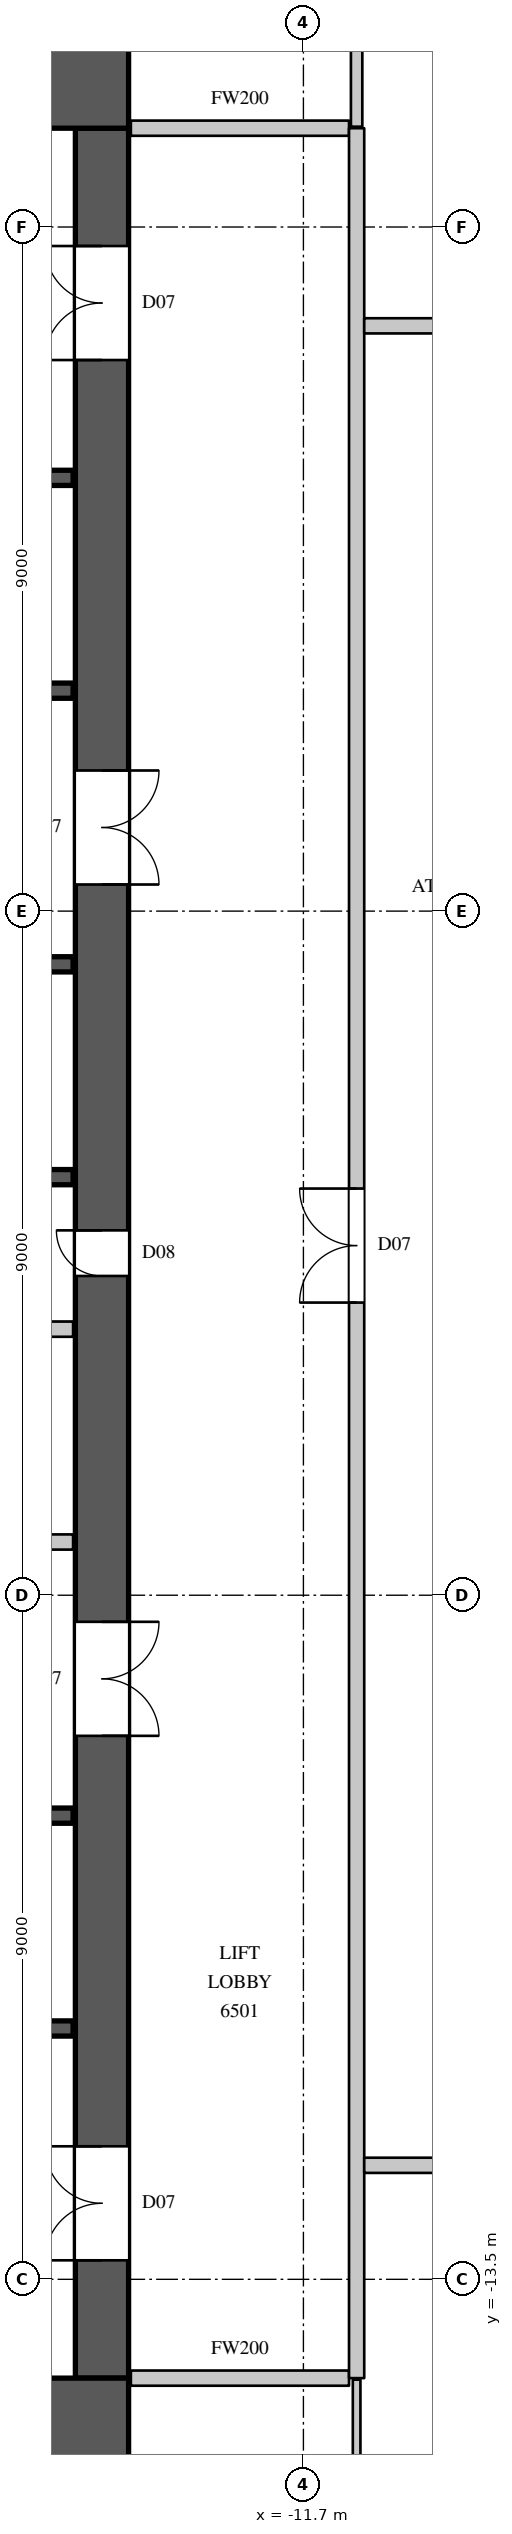
"""IFC4 building model, lengths in metres.
Left out: names, types, materials, properties, quantities, classifications, styles, units other than length and angle.
Written with IfcOpenShell. Run it as: python <this file> out.ifc"""

import sys

from ifc_helpers import new_model, si_unit, direction, frame, frame_2d, origin, place, context, subcontext, project, spatial, rectangle, extrude, element, fill, save


model = new_model("IFC4")
c1 = context("Model", 3, precision=1e-05, world=origin(), true_north=direction((0.0, 1.0)))
c2 = subcontext(c1, "Body", "Model", "MODEL_VIEW")
j1 = project(units=[si_unit("LENGTHUNIT", "METRE"), si_unit("PLANEANGLEUNIT", "RADIAN")], contexts=[c1])
p1 = place(None, origin())
s1 = spatial("IfcSite", under=j1, at=p1, CompositionType="ELEMENT")
p2 = place(p1, origin())
s2 = spatial("IfcBuilding", under=s1, at=p2, CompositionType="ELEMENT")
p3 = place(p2, frame((0.0, 0.0, 288.5)))
s3 = spatial("IfcBuildingStorey", under=s2, at=p3, CompositionType="ELEMENT", Elevation=288.5)
for number, where, z_axis, x_axis in (
    (1, (-30.0, 15.4, 0.0), (0.0, 0.0, 1.0), (1.0, 0.0, 0.0)),
    (2, (-30.0, -15.4, 0.0), (0.0, 0.0, 1.0), (1.0, 0.0, 0.0)),
):
    element("IfcWall", number, at=place(p3, frame(where, z_axis=z_axis, x_axis=x_axis)), inside=s3, PredefinedType="SHEAR", context=c2, shape_type="SweptSolid", body=[
        extrude(rectangle(XDim=16.0, YDim=1.2, at=frame_2d((8.0, 0.0))), origin(), (0.0, 0.0, 1.0), 4.1),
    ])
p4 = place(p3, frame((-14.35, -14.8, 0.0), z_axis=(0.0, 0.0, 1.0), x_axis=(0.0, 1.0, 0.0)))
e3 = element("IfcWall", 3, at=p4, inside=s3, PredefinedType="SHEAR", context=c2, shape_type="SweptSolid", body=[
    extrude(rectangle(XDim=29.6, YDim=0.7, at=frame_2d((14.8, 0.0))), origin(), (0.0, 0.0, 1.0), 4.1),
])
p5 = place(p4, frame((1.55, 0.0, 0.0)))
e4 = element("IfcOpeningElement", 4, at=p5, cuts=e3, PredefinedType="OPENING", context=c2, shape_type="SweptSolid", body=[
    extrude(rectangle(XDim=1.5, YDim=2.4, at=frame_2d((0.75, 1.2))), frame((0.0, 0.36, 0.0), z_axis=(0.0, -1.0, 0.0), x_axis=(1.0, 0.0, 0.0)), (0.0, 0.0, 1.0), 0.72),
])
p6 = place(p4, frame((26.55, 0.0, 0.0)))
e5 = element("IfcOpeningElement", 5, at=p6, cuts=e3, PredefinedType="OPENING", context=c2, shape_type="SweptSolid", body=[
    extrude(rectangle(XDim=1.5, YDim=2.4, at=frame_2d((0.75, 1.2))), frame((0.0, 0.36, 0.0), z_axis=(0.0, -1.0, 0.0), x_axis=(1.0, 0.0, 0.0)), (0.0, 0.0, 1.0), 0.72),
])
p7 = place(p4, frame((8.45, 0.0, 0.0)))
e6 = element("IfcOpeningElement", 6, at=p7, cuts=e3, PredefinedType="OPENING", context=c2, shape_type="SweptSolid", body=[
    extrude(rectangle(XDim=1.5, YDim=2.4, at=frame_2d((0.75, 1.2))), frame((0.0, 0.36, 0.0), z_axis=(0.0, -1.0, 0.0), x_axis=(1.0, 0.0, 0.0)), (0.0, 0.0, 1.0), 0.72),
])
p8 = place(p4, frame((19.65, 0.0, 0.0)))
e7 = element("IfcOpeningElement", 7, at=p8, cuts=e3, PredefinedType="OPENING", context=c2, shape_type="SweptSolid", body=[
    extrude(rectangle(XDim=1.5, YDim=2.4, at=frame_2d((0.75, 1.2))), frame((0.0, 0.36, 0.0), z_axis=(0.0, -1.0, 0.0), x_axis=(1.0, 0.0, 0.0)), (0.0, 0.0, 1.0), 0.72),
])
p9 = place(p4, frame((14.5, 0.0, 0.0)))
e8 = element("IfcOpeningElement", 8, at=p9, cuts=e3, PredefinedType="OPENING", context=c2, shape_type="SweptSolid", body=[
    extrude(rectangle(XDim=0.6, YDim=2.0, at=frame_2d((0.3, 1.0))), frame((0.0, 0.36, 0.0), z_axis=(0.0, -1.0, 0.0), x_axis=(1.0, 0.0, 0.0)), (0.0, 0.0, 1.0), 0.72),
])
p10 = place(p3, frame((-29.27, -3.8, 0.0), z_axis=(0.0, 0.0, 1.0), x_axis=(1.0, 0.0, 0.0)))
e9 = element("IfcWall", 9, at=p10, inside=s3, PredefinedType="PARTITIONING", context=c2, shape_type="SweptSolid", body=[
    extrude(rectangle(XDim=14.54, YDim=0.2, at=frame_2d((7.27, 0.0))), origin(), (0.0, 0.0, 1.0), 3.8),
])
p11 = place(p10, frame((1.15, 0.0, 0.0)))
e10 = element("IfcOpeningElement", 10, at=p11, cuts=e9, PredefinedType="OPENING", context=c2, shape_type="SweptSolid", body=[
    extrude(rectangle(XDim=0.9, YDim=2.2, at=frame_2d((0.45, 1.1))), frame((0.0, 0.11, 0.0), z_axis=(0.0, -1.0, 0.0), x_axis=(1.0, 0.0, 0.0)), (0.0, 0.0, 1.0), 0.22),
])
p12 = place(p10, frame((5.0, 0.0, 0.0)))
e11 = element("IfcOpeningElement", 11, at=p12, cuts=e9, PredefinedType="OPENING", context=c2, shape_type="SweptSolid", body=[
    extrude(rectangle(XDim=0.9, YDim=2.2, at=frame_2d((0.45, 1.1))), frame((0.0, 0.11, 0.0), z_axis=(0.0, -1.0, 0.0), x_axis=(1.0, 0.0, 0.0)), (0.0, 0.0, 1.0), 0.22),
])
p13 = place(p10, frame((10.65, 0.0, 0.0)))
e12 = element("IfcOpeningElement", 12, at=p13, cuts=e9, PredefinedType="OPENING", context=c2, shape_type="SweptSolid", body=[
    extrude(rectangle(XDim=0.9, YDim=2.2, at=frame_2d((0.45, 1.1))), frame((0.0, 0.11, 0.0), z_axis=(0.0, -1.0, 0.0), x_axis=(1.0, 0.0, 0.0)), (0.0, 0.0, 1.0), 0.22),
])
for number, where, z_axis, x_axis in (
    (13, (-13.97, -14.8, 0.0), (0.0, 0.0, 1.0), (1.0, 0.0, 0.0)),
    (14, (-13.97, 14.8, 0.0), (0.0, 0.0, 1.0), (1.0, 0.0, 0.0)),
):
    element("IfcWall", number, at=place(p3, frame(where, z_axis=z_axis, x_axis=x_axis)), inside=s3, PredefinedType="PARTITIONING", context=c2, shape_type="SweptSolid", body=[
        extrude(rectangle(XDim=2.87, YDim=0.2, at=frame_2d((1.435, 0.0))), origin(), (0.0, 0.0, 1.0), 3.8),
    ])
p14 = place(p3, frame((-11.0, -14.8, 0.0), z_axis=(0.0, 0.0, 1.0), x_axis=(0.0, 1.0, 0.0)))
e15 = element("IfcWall", 15, at=p14, inside=s3, PredefinedType="PARTITIONING", context=c2, shape_type="SweptSolid", body=[
    extrude(rectangle(XDim=29.6, YDim=0.2, at=frame_2d((14.8, 0.0))), origin(), (0.0, 0.0, 1.0), 3.8),
])
p15 = place(p14, frame((14.15, 0.0, 0.0)))
e16 = element("IfcOpeningElement", 16, at=p15, cuts=e15, PredefinedType="OPENING", context=c2, shape_type="SweptSolid", body=[
    extrude(rectangle(XDim=1.5, YDim=2.4, at=frame_2d((0.75, 1.2))), frame((0.0, 0.11, 0.0), z_axis=(0.0, -1.0, 0.0), x_axis=(1.0, 0.0, 0.0)), (0.0, 0.0, 1.0), 0.22),
])
p16 = place(p3, frame((-10.9, -12.0, 0.0), z_axis=(0.0, 0.0, 1.0), x_axis=(1.0, 0.0, 0.0)))
e17 = element("IfcWall", 17, at=p16, inside=s3, PredefinedType="PARTITIONING", context=c2, shape_type="SweptSolid", body=[
    extrude(rectangle(XDim=21.8, YDim=0.2, at=frame_2d((10.9, 0.0))), origin(), (0.0, 0.0, 1.0), 3.8),
])
p17 = place(p16, frame((1.1, 0.0, 0.0)))
e18 = element("IfcOpeningElement", 18, at=p17, cuts=e17, PredefinedType="OPENING", context=c2, shape_type="SweptSolid", body=[
    extrude(rectangle(XDim=0.9, YDim=2.2, at=frame_2d((0.45, 1.1))), frame((0.0, 0.11, 0.0), z_axis=(0.0, -1.0, 0.0), x_axis=(1.0, 0.0, 0.0)), (0.0, 0.0, 1.0), 0.22),
])
p18 = place(p16, frame((4.9, 0.0, 0.0)))
e19 = element("IfcOpeningElement", 19, at=p18, cuts=e17, PredefinedType="OPENING", context=c2, shape_type="SweptSolid", body=[
    extrude(rectangle(XDim=0.9, YDim=2.2, at=frame_2d((0.45, 1.1))), frame((0.0, 0.11, 0.0), z_axis=(0.0, -1.0, 0.0), x_axis=(1.0, 0.0, 0.0)), (0.0, 0.0, 1.0), 0.22),
])
p19 = place(p16, frame((7.0, 0.0, 0.0)))
e20 = element("IfcOpeningElement", 20, at=p19, cuts=e17, PredefinedType="OPENING", context=c2, shape_type="SweptSolid", body=[
    extrude(rectangle(XDim=0.9, YDim=2.2, at=frame_2d((0.45, 1.1))), frame((0.0, 0.11, 0.0), z_axis=(0.0, -1.0, 0.0), x_axis=(1.0, 0.0, 0.0)), (0.0, 0.0, 1.0), 0.22),
])
p20 = place(p16, frame((9.95, 0.0, 0.0)))
e21 = element("IfcOpeningElement", 21, at=p20, cuts=e17, PredefinedType="OPENING", context=c2, shape_type="SweptSolid", body=[
    extrude(rectangle(XDim=1.1, YDim=2.4, at=frame_2d((0.55, 1.2))), frame((0.0, 0.11, 0.0), z_axis=(0.0, -1.0, 0.0), x_axis=(1.0, 0.0, 0.0)), (0.0, 0.0, 1.0), 0.22),
])
p21 = place(p3, frame((-10.9, 12.2, 0.0), z_axis=(0.0, 0.0, 1.0), x_axis=(1.0, 0.0, 0.0)))
e22 = element("IfcWall", 22, at=p21, inside=s3, PredefinedType="PARTITIONING", context=c2, shape_type="SweptSolid", body=[
    extrude(rectangle(XDim=3.756, YDim=0.2, at=frame_2d((1.878, 0.0))), origin(), (0.0, 0.0, 1.0), 3.8),
])
p22 = place(p21, frame((0.95, 0.0, 0.0)))
e23 = element("IfcOpeningElement", 23, at=p22, cuts=e22, PredefinedType="OPENING", context=c2, shape_type="SweptSolid", body=[
    extrude(rectangle(XDim=1.1, YDim=2.4, at=frame_2d((0.55, 1.2))), frame((0.0, 0.11, 0.0), z_axis=(0.0, -1.0, 0.0), x_axis=(1.0, 0.0, 0.0)), (0.0, 0.0, 1.0), 0.22),
])
p23 = place(p3, frame((-11.0, 14.82, 0.0), z_axis=(0.0, 0.0, 1.0), x_axis=(0.0, 1.0, 0.0)))
e24 = element("IfcWall", 24, at=p23, inside=s3, PredefinedType="PARTITIONING", context=c2, shape_type="SweptSolid", body=[
    extrude(rectangle(XDim=9.883, YDim=0.15, at=frame_2d((4.942, 0.0))), origin(), (0.0, 0.0, 1.0), 3.8),
])
p24 = place(p3, frame((-29.27, -1.0, 0.0), z_axis=(0.0, 0.0, 1.0), x_axis=(1.0, 0.0, 0.0)))
e25 = element("IfcWall", 25, at=p24, inside=s3, PredefinedType="PARTITIONING", context=c2, shape_type="SweptSolid", body=[
    extrude(rectangle(XDim=14.54, YDim=0.2, at=frame_2d((7.27, 0.0))), origin(), (0.0, 0.0, 1.0), 3.8),
])
p25 = place(p3, frame((-17.92, -10.2, 0.0), z_axis=(0.0, 0.0, 1.0), x_axis=(1.0, 0.0, 0.0)))
e26 = element("IfcWall", 26, at=p25, inside=s3, PredefinedType="SHEAR", context=c2, shape_type="SweptSolid", body=[
    extrude(rectangle(XDim=3.19, YDim=0.2, at=frame_2d((1.595, 0.0))), origin(), (0.0, 0.0, 1.0), 3.8),
])
p26 = place(p25, frame((1.05, 0.0, 0.0)))
e27 = element("IfcOpeningElement", 27, at=p26, cuts=e26, PredefinedType="OPENING", context=c2, shape_type="SweptSolid", body=[
    extrude(rectangle(XDim=1.1, YDim=2.2, at=frame_2d((0.55, 1.1))), frame((0.0, 0.11, 0.0), z_axis=(0.0, -1.0, 0.0), x_axis=(1.0, 0.0, 0.0)), (0.0, 0.0, 1.0), 0.22),
])
for number, where, z_axis, x_axis in (
    (28, (-17.9, -7.4, 0.0), (0.0, 0.0, 1.0), (1.0, 0.0, 0.0)),
    (29, (-17.9, 1.0, 0.0), (0.0, 0.0, 1.0), (1.0, 0.0, 0.0)),
):
    element("IfcWall", number, at=place(p3, frame(where, z_axis=z_axis, x_axis=x_axis)), inside=s3, PredefinedType="SHEAR", context=c2, shape_type="SweptSolid", body=[
        extrude(rectangle(XDim=3.17, YDim=0.2, at=frame_2d((1.585, 0.0))), origin(), (0.0, 0.0, 1.0), 3.8),
    ])
p27 = place(p3, frame((-17.9, 3.8, 0.0), z_axis=(0.0, 0.0, 1.0), x_axis=(1.0, 0.0, 0.0)))
e30 = element("IfcWall", 30, at=p27, inside=s3, PredefinedType="SHEAR", context=c2, shape_type="SweptSolid", body=[
    extrude(rectangle(XDim=3.17, YDim=0.2, at=frame_2d((1.585, 0.0))), origin(), (0.0, 0.0, 1.0), 3.8),
])
p28 = place(p27, frame((1.05, 0.0, 0.0)))
e31 = element("IfcOpeningElement", 31, at=p28, cuts=e30, PredefinedType="OPENING", context=c2, shape_type="SweptSolid", body=[
    extrude(rectangle(XDim=1.1, YDim=2.2, at=frame_2d((0.55, 1.1))), frame((0.0, 0.11, 0.0), z_axis=(0.0, -1.0, 0.0), x_axis=(1.0, 0.0, 0.0)), (0.0, 0.0, 1.0), 0.22),
])
p29 = place(p3, frame((-17.92, 7.4, 0.0), z_axis=(0.0, 0.0, 1.0), x_axis=(1.0, 0.0, 0.0)))
e32 = element("IfcWall", 32, at=p29, inside=s3, PredefinedType="SHEAR", context=c2, shape_type="SweptSolid", body=[
    extrude(rectangle(XDim=3.19, YDim=0.2, at=frame_2d((1.595, 0.0))), origin(), (0.0, 0.0, 1.0), 3.8),
])
p30 = place(p3, frame((-17.92, 10.2, 0.0), z_axis=(0.0, 0.0, 1.0), x_axis=(1.0, 0.0, 0.0)))
e33 = element("IfcWall", 33, at=p30, inside=s3, PredefinedType="SHEAR", context=c2, shape_type="SweptSolid", body=[
    extrude(rectangle(XDim=3.19, YDim=0.2, at=frame_2d((1.595, 0.0))), origin(), (0.0, 0.0, 1.0), 3.8),
])
p31 = place(p30, frame((1.05, 0.0, 0.0)))
e34 = element("IfcOpeningElement", 34, at=p31, cuts=e33, PredefinedType="OPENING", context=c2, shape_type="SweptSolid", body=[
    extrude(rectangle(XDim=1.1, YDim=2.2, at=frame_2d((0.55, 1.1))), frame((0.0, 0.11, 0.0), z_axis=(0.0, -1.0, 0.0), x_axis=(1.0, 0.0, 0.0)), (0.0, 0.0, 1.0), 0.22),
])
p32 = place(p3, frame((-11.0, -23.757, 0.0), z_axis=(0.0, 0.0, 1.0), x_axis=(0.0, 1.0, 0.0)))
e35 = element("IfcWall", 35, at=p32, inside=s3, PredefinedType="PARTITIONING", context=c2, shape_type="SweptSolid", body=[
    extrude(rectangle(XDim=8.937, YDim=0.1, at=frame_2d((4.468, 0.0))), origin(), (0.0, 0.0, 1.0), 3.8),
])
p33 = place(p15, origin())
e36 = element("IfcDoor", 36, at=p33, inside=s3, OperationType="DOUBLE_DOOR_SINGLE_SWING", PredefinedType="DOOR", context=c2, shape_type="SweptSolid", body=[
    extrude(rectangle(XDim=1.5, YDim=2.4, at=frame_2d((0.75, 1.2))), frame((0.0, 0.025, 0.0), z_axis=(0.0, -1.0, 0.0), x_axis=(1.0, 0.0, 0.0)), (0.0, 0.0, 1.0), 0.05),
])
fill(e16, e36)
p34 = place(p5, origin())
e37 = element("IfcDoor", 37, at=p34, inside=s3, OperationType="DOUBLE_DOOR_SINGLE_SWING", PredefinedType="DOOR", context=c2, shape_type="SweptSolid", body=[
    extrude(rectangle(XDim=1.5, YDim=2.4, at=frame_2d((0.75, 1.2))), frame((0.0, 0.345, 0.0), z_axis=(0.0, -1.0, 0.0), x_axis=(1.0, 0.0, 0.0)), (0.0, 0.0, 1.0), 0.05),
])
fill(e4, e37)
p35 = place(p6, origin())
e38 = element("IfcDoor", 38, at=p35, inside=s3, OperationType="DOUBLE_DOOR_SINGLE_SWING", PredefinedType="DOOR", context=c2, shape_type="SweptSolid", body=[
    extrude(rectangle(XDim=1.5, YDim=2.4, at=frame_2d((0.75, 1.2))), frame((0.0, 0.345, 0.0), z_axis=(0.0, -1.0, 0.0), x_axis=(1.0, 0.0, 0.0)), (0.0, 0.0, 1.0), 0.05),
])
fill(e5, e38)
p36 = place(p7, origin())
e39 = element("IfcDoor", 39, at=p36, inside=s3, OperationType="DOUBLE_DOOR_SINGLE_SWING", PredefinedType="DOOR", context=c2, shape_type="SweptSolid", body=[
    extrude(rectangle(XDim=1.5, YDim=2.4, at=frame_2d((0.75, 1.2))), frame((0.0, -0.295, 0.0), z_axis=(0.0, -1.0, 0.0), x_axis=(1.0, 0.0, 0.0)), (0.0, 0.0, 1.0), 0.05),
])
fill(e6, e39)
p37 = place(p8, origin())
e40 = element("IfcDoor", 40, at=p37, inside=s3, OperationType="DOUBLE_DOOR_SINGLE_SWING", PredefinedType="DOOR", context=c2, shape_type="SweptSolid", body=[
    extrude(rectangle(XDim=1.5, YDim=2.4, at=frame_2d((0.75, 1.2))), frame((0.0, -0.295, 0.0), z_axis=(0.0, -1.0, 0.0), x_axis=(1.0, 0.0, 0.0)), (0.0, 0.0, 1.0), 0.05),
])
fill(e7, e40)
p38 = place(p9, origin())
e41 = element("IfcDoor", 41, at=p38, inside=s3, OperationType="SINGLE_SWING_RIGHT", PredefinedType="DOOR", context=c2, shape_type="SweptSolid", body=[
    extrude(rectangle(XDim=0.6, YDim=2.0, at=frame_2d((0.3, 1.0))), frame((0.0, 0.345, 0.0), z_axis=(0.0, -1.0, 0.0), x_axis=(1.0, 0.0, 0.0)), (0.0, 0.0, 1.0), 0.05),
])
fill(e8, e41)
save(model, sys.argv[1])
